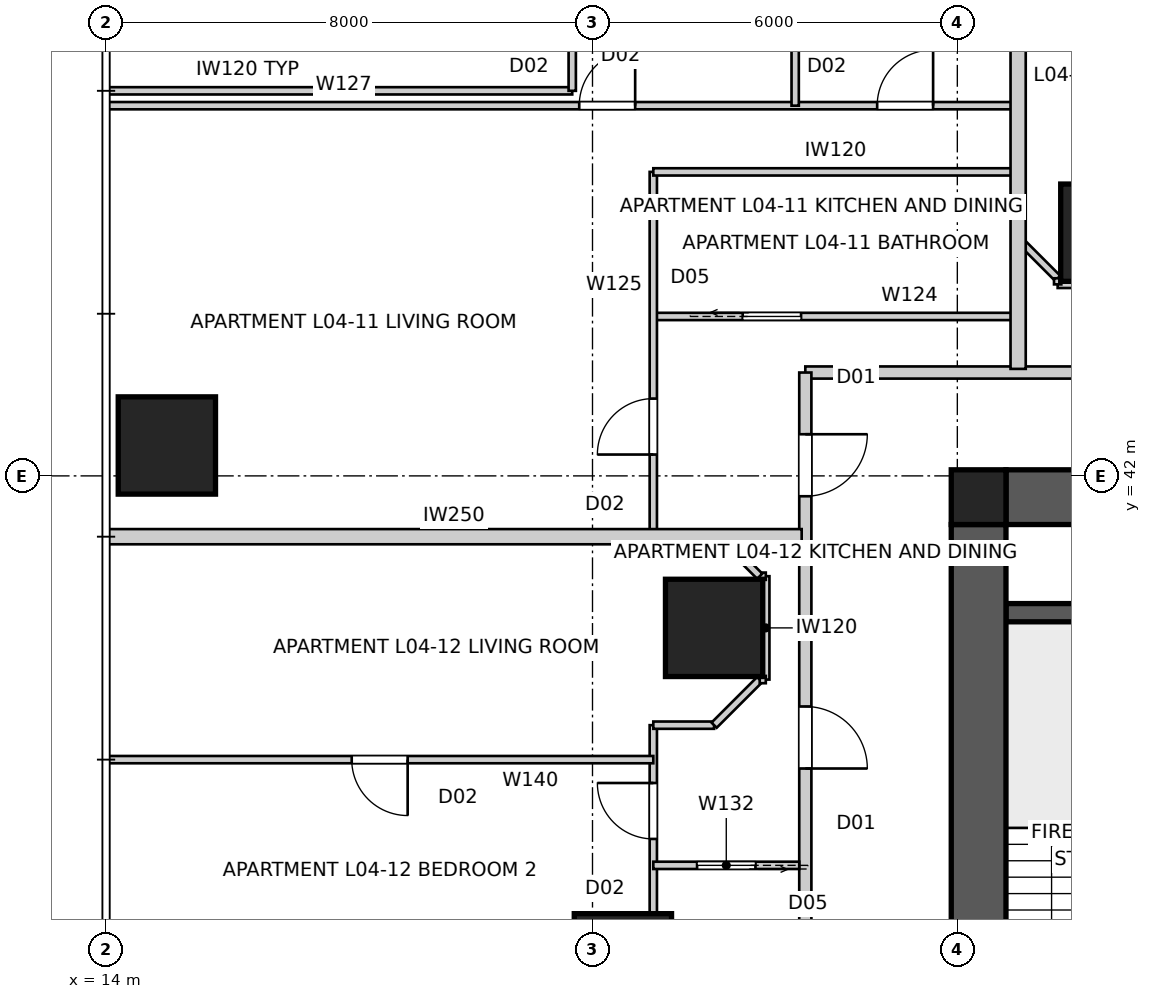
"""IFC4 building model, lengths in metres.
Left out: names, types, materials, properties, quantities, classifications, styles, units other than length and angle.
Written with IfcOpenShell. Run it as: python <this file> out.ifc"""

import sys

from ifc_helpers import new_model, si_unit, direction, frame, frame_2d, origin, origin_2d, place, context, subcontext, project, spatial, polyline, rectangle, outline, extrude, element, fill, save


model = new_model("IFC4")
c1 = context("Model", 3, precision=1e-05, world=origin(), true_north=direction((0.0, 1.0)))
c2 = subcontext(c1, "Body", "Model", "MODEL_VIEW")
j1 = project(units=[si_unit("LENGTHUNIT", "METRE"), si_unit("PLANEANGLEUNIT", "RADIAN")], contexts=[c1])
p1 = place(None, origin())
s1 = spatial("IfcSite", under=j1, at=p1, CompositionType="ELEMENT")
p2 = place(p1, origin())
s2 = spatial("IfcBuilding", under=s1, at=p2, CompositionType="ELEMENT")
p3 = place(p2, frame((0.0, 0.0, 18.4)))
s3 = spatial("IfcBuildingStorey", under=s2, at=p3, CompositionType="ELEMENT", Elevation=18.4)
p4 = place(p3, frame((28.8, 41.65, 0.0), z_axis=(0.0, 0.0, 1.0), x_axis=(1.0, 0.0, 0.0)))
e1 = element("IfcWall", 1, at=p4, inside=s3, PredefinedType="SHEAR", context=c2, shape_type="SweptSolid", body=[
    extrude(outline(polyline([(0.0, -0.45), (22.4, -0.45), (22.4, -0.025), (22.85, -0.025), (22.85, 0.025), (22.4, 0.025), (22.4, 0.45), (0.0, 0.45), (0.0, 0.025), (-0.45, 0.025), (-0.45, -0.025), (0.0, -0.025), (0.0, -0.45)])), origin(), (0.0, 0.0, 1.0), 3.4),
])
p5 = place(p3, frame((28.35, 41.2, 0.0), z_axis=(0.0, 0.0, 1.0), x_axis=(0.0, -1.0, 0.0)))
e2 = element("IfcWall", 2, at=p5, inside=s3, PredefinedType="SHEAR", context=c2, shape_type="SweptSolid", body=[
    extrude(outline(polyline([(0.0, -0.45), (22.4, -0.45), (22.4, -0.025), (22.85, -0.025), (22.85, 0.025), (22.4, 0.025), (22.4, 0.45), (0.0, 0.45), (0.0, 0.025), (-0.45, 0.025), (-0.45, -0.025), (0.0, -0.025), (0.0, -0.45)])), origin(), (0.0, 0.0, 1.0), 3.4),
])
p6 = place(p5, frame((11.14, 0.0, 0.0)))
e3 = element("IfcOpeningElement", 3, at=p6, cuts=e2, PredefinedType="OPENING", context=c2, shape_type="SweptSolid", body=[
    extrude(rectangle(XDim=1.02, YDim=2.4, at=frame_2d((0.51, 1.2))), frame((0.0, 0.46, 0.0), z_axis=(0.0, -1.0, 0.0), x_axis=(1.0, 0.0, 0.0)), (0.0, 0.0, 1.0), 0.92),
])
p7 = place(p3, frame((28.8, 39.75, 0.0), z_axis=(0.0, 0.0, 1.0), x_axis=(1.0, 0.0, 0.0)))
e4 = element("IfcWall", 4, at=p7, inside=s3, PredefinedType="SHEAR", context=c2, shape_type="SweptSolid", body=[
    extrude(rectangle(XDim=3.5, YDim=0.3, at=frame_2d((1.75, 0.0))), origin(), (0.0, 0.0, 1.0), 3.4),
])
p8 = place(p3, frame((28.35, 41.65, 0.0), z_axis=(0.0, 0.0, 1.0), x_axis=(1.0, 0.0, 0.0)))
e5 = element("IfcColumn", 5, at=p8, inside=s3, PredefinedType="COLUMN", context=c2, shape_type="SweptSolid", body=[
    extrude(rectangle(XDim=0.9, YDim=0.9, at=origin_2d()), origin(), (0.0, 0.0, 1.0), 3.4),
])
for number, where, z_axis, x_axis in (
    (6, (15.0, 42.5, 0.0), (0.0, 0.0, 1.0), (1.0, 0.0, 0.0)),
    (7, (30.5, 46.0, 0.0), (0.0, 0.0, 1.0), (1.0, 0.0, 0.0)),
    (8, (24.0, 39.5, 0.0), (0.0, 0.0, 1.0), (1.0, 0.0, 0.0)),
    (9, (22.5, 34.0, 0.0), (0.0, 0.0, 1.0), (1.0, 0.0, 0.0)),
):
    element("IfcColumn", number, at=place(p3, frame(where, z_axis=z_axis, x_axis=x_axis)), inside=s3, PredefinedType="COLUMN", context=c2, shape_type="SweptSolid", body=[
        extrude(rectangle(XDim=1.6, YDim=1.6, at=origin_2d()), origin(), (0.0, 0.0, 1.0), 3.4),
    ])
p9 = place(p3, frame((54.5, 43.7, 0.0), z_axis=(0.0, 0.0, 1.0), x_axis=(-1.0, 0.0, 0.0)))
e10 = element("IfcWall", 10, at=p9, inside=s3, PredefinedType="PARTITIONING", context=c2, shape_type="SweptSolid", body=[
    extrude(rectangle(XDim=29.0, YDim=0.2, at=frame_2d((14.5, 0.0))), origin(), (0.0, 0.0, 1.0), 3.25),
])
p10 = place(p9, frame((22.253, 0.0, 0.0)))
e11 = element("IfcOpeningElement", 11, at=p10, cuts=e10, PredefinedType="OPENING", context=c2, shape_type="SweptSolid", body=[
    extrude(rectangle(XDim=1.02, YDim=2.34, at=frame_2d((0.51, 1.17))), frame((0.0, 0.11, 0.0), z_axis=(0.0, -1.0, 0.0), x_axis=(1.0, 0.0, 0.0)), (0.0, 0.0, 1.0), 0.22),
])
p11 = place(p9, frame((5.393, 0.0, 0.0)))
e12 = element("IfcOpeningElement", 12, at=p11, cuts=e10, PredefinedType="OPENING", context=c2, shape_type="SweptSolid", body=[
    extrude(rectangle(XDim=1.02, YDim=2.34, at=frame_2d((0.51, 1.17))), frame((0.0, 0.11, 0.0), z_axis=(0.0, -1.0, 0.0), x_axis=(1.0, 0.0, 0.0)), (0.0, 0.0, 1.0), 0.22),
])
p12 = place(p9, frame((1.281, 0.0, 0.0)))
e13 = element("IfcOpeningElement", 13, at=p12, cuts=e10, PredefinedType="OPENING", context=c2, shape_type="SweptSolid", body=[
    extrude(rectangle(XDim=1.02, YDim=2.34, at=frame_2d((0.51, 1.17))), frame((0.0, 0.11, 0.0), z_axis=(0.0, -1.0, 0.0), x_axis=(1.0, 0.0, 0.0)), (0.0, 0.0, 1.0), 0.22),
])
p13 = place(p3, frame((25.5, 43.7, 0.0), z_axis=(0.0, 0.0, 1.0), x_axis=(0.0, -1.0, 0.0)))
e14 = element("IfcWall", 14, at=p13, inside=s3, PredefinedType="PARTITIONING", context=c2, shape_type="SweptSolid", body=[
    extrude(rectangle(XDim=27.4, YDim=0.2, at=frame_2d((13.7, 0.0))), origin(), (0.0, 0.0, 1.0), 3.25),
])
p14 = place(p13, frame((5.493, 0.0, 0.0)))
e15 = element("IfcOpeningElement", 15, at=p14, cuts=e14, PredefinedType="OPENING", context=c2, shape_type="SweptSolid", body=[
    extrude(rectangle(XDim=1.02, YDim=2.34, at=frame_2d((0.51, 1.17))), frame((0.0, 0.11, 0.0), z_axis=(0.0, -1.0, 0.0), x_axis=(1.0, 0.0, 0.0)), (0.0, 0.0, 1.0), 0.22),
])
p15 = place(p13, frame((15.16, 0.0, 0.0)))
e16 = element("IfcOpeningElement", 16, at=p15, cuts=e14, PredefinedType="OPENING", context=c2, shape_type="SweptSolid", body=[
    extrude(rectangle(XDim=1.02, YDim=2.34, at=frame_2d((0.51, 1.17))), frame((0.0, 0.11, 0.0), z_axis=(0.0, -1.0, 0.0), x_axis=(1.0, 0.0, 0.0)), (0.0, 0.0, 1.0), 0.22),
])
p16 = place(p13, frame((25.365, 0.0, 0.0)))
e17 = element("IfcOpeningElement", 17, at=p16, cuts=e14, PredefinedType="OPENING", context=c2, shape_type="SweptSolid", body=[
    extrude(rectangle(XDim=1.02, YDim=2.34, at=frame_2d((0.51, 1.17))), frame((0.0, 0.11, 0.0), z_axis=(0.0, -1.0, 0.0), x_axis=(1.0, 0.0, 0.0)), (0.0, 0.0, 1.0), 0.22),
])
p17 = place(p13, frame((1.015, 0.0, 0.0)))
e18 = element("IfcOpeningElement", 18, at=p17, cuts=e14, PredefinedType="OPENING", context=c2, shape_type="SweptSolid", body=[
    extrude(rectangle(XDim=1.02, YDim=2.34, at=frame_2d((0.51, 1.17))), frame((0.0, 0.11, 0.0), z_axis=(0.0, -1.0, 0.0), x_axis=(1.0, 0.0, 0.0)), (0.0, 0.0, 1.0), 0.22),
])
p18 = place(p3, frame((29.0, 56.0, 0.0), z_axis=(0.0, 0.0, 1.0), x_axis=(0.0, -1.0, 0.0)))
e19 = element("IfcWall", 19, at=p18, inside=s3, PredefinedType="PARTITIONING", context=c2, shape_type="SweptSolid", body=[
    extrude(rectangle(XDim=12.24, YDim=0.25, at=frame_2d((6.12, 0.0))), origin(), (0.0, 0.0, 1.0), 3.25),
])
p19 = place(p3, frame((14.0, 41.0, 0.0), z_axis=(0.0, 0.0, 1.0), x_axis=(1.0, 0.0, 0.0)))
e20 = element("IfcWall", 20, at=p19, inside=s3, PredefinedType="PARTITIONING", context=c2, shape_type="SweptSolid", body=[
    extrude(rectangle(XDim=11.44, YDim=0.25, at=frame_2d((5.72, 0.0))), origin(), (0.0, 0.0, 1.0), 3.25),
])
p20 = place(p3, frame((23.0, 22.667, 0.0), z_axis=(0.0, 0.0, 1.0), x_axis=(0.0, 1.0, 0.0)))
e21 = element("IfcWall", 21, at=p20, inside=s3, PredefinedType="PARTITIONING", context=c2, shape_type="SweptSolid", body=[
    extrude(rectangle(XDim=15.233, YDim=0.12, at=frame_2d((7.617, 0.0))), origin(), (0.0, 0.0, 1.0), 2.55),
])
p21 = place(p20, frame((13.362, 0.0, 0.0)))
e22 = element("IfcOpeningElement", 22, at=p21, cuts=e21, PredefinedType="OPENING", context=c2, shape_type="SweptSolid", body=[
    extrude(rectangle(XDim=0.92, YDim=2.34, at=frame_2d((0.46, 1.17))), frame((0.0, 0.07, 0.0), z_axis=(0.0, -1.0, 0.0), x_axis=(1.0, 0.0, 0.0)), (0.0, 0.0, 1.0), 0.14),
])
p22 = place(p20, frame((5.015, 0.0, 0.0)))
e23 = element("IfcOpeningElement", 23, at=p22, cuts=e21, PredefinedType="OPENING", context=c2, shape_type="SweptSolid", body=[
    extrude(rectangle(XDim=0.92, YDim=2.34, at=frame_2d((0.46, 1.17))), frame((0.0, 0.07, 0.0), z_axis=(0.0, -1.0, 0.0), x_axis=(1.0, 0.0, 0.0)), (0.0, 0.0, 1.0), 0.14),
])
p23 = place(p20, frame((8.362, 0.0, 0.0)))
e24 = element("IfcOpeningElement", 24, at=p23, cuts=e21, PredefinedType="OPENING", context=c2, shape_type="SweptSolid", body=[
    extrude(rectangle(XDim=0.96, YDim=2.1, at=frame_2d((0.48, 1.05))), frame((0.0, 0.07, 0.0), z_axis=(0.0, -1.0, 0.0), x_axis=(1.0, 0.0, 0.0)), (0.0, 0.0, 1.0), 0.14),
])
p24 = place(p3, frame((29.0, 45.9, 0.0), z_axis=(0.0, 0.0, 1.0), x_axis=(0.707106781187, -0.707106781187, 0.0)))
e25 = element("IfcWall", 25, at=p24, inside=s3, PredefinedType="PARTITIONING", context=c2, shape_type="SweptSolid", body=[
    extrude(rectangle(XDim=0.919, YDim=0.12, at=frame_2d((0.459, 0.0))), origin(), (0.0, 0.0, 1.0), 3.25),
])
p25 = place(p3, frame((29.65, 45.15, 0.0), z_axis=(0.0, 0.0, 1.0), x_axis=(1.0, 0.0, 0.0)))
e26 = element("IfcWall", 26, at=p25, inside=s3, PredefinedType="PARTITIONING", context=c2, shape_type="SweptSolid", body=[
    extrude(rectangle(XDim=1.7, YDim=0.12, at=frame_2d((0.85, 0.0))), origin(), (0.0, 0.0, 1.0), 3.25),
])
p26 = place(p3, frame((23.0, 44.622, 0.0), z_axis=(0.0, 0.0, 1.0), x_axis=(1.0, 0.0, 0.0)))
e27 = element("IfcWall", 27, at=p26, inside=s3, PredefinedType="PARTITIONING", context=c2, shape_type="SweptSolid", body=[
    extrude(rectangle(XDim=6.0, YDim=0.12, at=frame_2d((3.0, 0.0))), origin(), (0.0, 0.0, 1.0), 2.638),
])
p27 = place(p26, frame((1.47, 0.0, 0.0)))
e28 = element("IfcOpeningElement", 28, at=p27, cuts=e27, PredefinedType="OPENING", context=c2, shape_type="SweptSolid", body=[
    extrude(rectangle(XDim=0.96, YDim=2.1, at=frame_2d((0.48, 1.05))), frame((0.0, 0.07, 0.0), z_axis=(0.0, -1.0, 0.0), x_axis=(1.0, 0.0, 0.0)), (0.0, 0.0, 1.0), 0.14),
])
p28 = place(p3, frame((23.0, 41.0, 0.0), z_axis=(0.0, 0.0, 1.0), x_axis=(0.0, 1.0, 0.0)))
e29 = element("IfcWall", 29, at=p28, inside=s3, PredefinedType="PARTITIONING", context=c2, shape_type="SweptSolid", body=[
    extrude(rectangle(XDim=6.0, YDim=0.12, at=frame_2d((3.0, 0.0))), origin(), (0.0, 0.0, 1.0), 3.25),
])
p29 = place(p28, frame((1.351, 0.0, 0.0)))
e30 = element("IfcOpeningElement", 30, at=p29, cuts=e29, PredefinedType="OPENING", context=c2, shape_type="SweptSolid", body=[
    extrude(rectangle(XDim=0.92, YDim=2.34, at=frame_2d((0.46, 1.17))), frame((0.0, 0.07, 0.0), z_axis=(0.0, -1.0, 0.0), x_axis=(1.0, 0.0, 0.0)), (0.0, 0.0, 1.0), 0.14),
])
p30 = place(p3, frame((23.0, 47.0, 0.0), z_axis=(0.0, 0.0, 1.0), x_axis=(1.0, 0.0, 0.0)))
e31 = element("IfcWall", 31, at=p30, inside=s3, PredefinedType="PARTITIONING", context=c2, shape_type="SweptSolid", body=[
    extrude(rectangle(XDim=6.0, YDim=0.12, at=frame_2d((3.0, 0.0))), origin(), (0.0, 0.0, 1.0), 3.25),
])
p31 = place(p3, frame((14.04, 48.089, 0.0), z_axis=(0.0, 0.0, 1.0), x_axis=(1.0, 0.0, 0.0)))
e32 = element("IfcWall", 32, at=p31, inside=s3, PredefinedType="PARTITIONING", context=c2, shape_type="SweptSolid", body=[
    extrude(rectangle(XDim=14.96, YDim=0.12, at=frame_2d((7.48, 0.0))), origin(), (0.0, 0.0, 1.0), 3.25),
])
p32 = place(p31, frame((7.742, 0.0, 0.0)))
e33 = element("IfcOpeningElement", 33, at=p32, cuts=e32, PredefinedType="OPENING", context=c2, shape_type="SweptSolid", body=[
    extrude(rectangle(XDim=0.92, YDim=2.34, at=frame_2d((0.46, 1.17))), frame((0.0, 0.07, 0.0), z_axis=(0.0, -1.0, 0.0), x_axis=(1.0, 0.0, 0.0)), (0.0, 0.0, 1.0), 0.14),
])
p33 = place(p31, frame((12.642, 0.0, 0.0)))
e34 = element("IfcOpeningElement", 34, at=p33, cuts=e32, PredefinedType="OPENING", context=c2, shape_type="SweptSolid", body=[
    extrude(rectangle(XDim=0.92, YDim=2.34, at=frame_2d((0.46, 1.17))), frame((0.0, 0.07, 0.0), z_axis=(0.0, -1.0, 0.0), x_axis=(1.0, 0.0, 0.0)), (0.0, 0.0, 1.0), 0.14),
])
p34 = place(p3, frame((25.333, 55.96, 0.0), z_axis=(0.0, 0.0, 1.0), x_axis=(0.0, -1.0, 0.0)))
e35 = element("IfcWall", 35, at=p34, inside=s3, PredefinedType="PARTITIONING", context=c2, shape_type="SweptSolid", body=[
    extrude(rectangle(XDim=7.871, YDim=0.12, at=frame_2d((3.936, 0.0))), origin(), (0.0, 0.0, 1.0), 2.638),
])
p35 = place(p3, frame((14.04, 48.333, 0.0), z_axis=(0.0, 0.0, 1.0), x_axis=(1.0, 0.0, 0.0)))
e36 = element("IfcWall", 36, at=p35, inside=s3, PredefinedType="PARTITIONING", context=c2, shape_type="SweptSolid", body=[
    extrude(rectangle(XDim=7.627, YDim=0.12, at=frame_2d((3.813, 0.0))), origin(), (0.0, 0.0, 1.0), 3.25),
])
p36 = place(p3, frame((21.667, 48.333, 0.0), z_axis=(0.0, 0.0, 1.0), x_axis=(0.0, 1.0, 0.0)))
e37 = element("IfcWall", 37, at=p36, inside=s3, PredefinedType="PARTITIONING", context=c2, shape_type="SweptSolid", body=[
    extrude(rectangle(XDim=7.627, YDim=0.12, at=frame_2d((3.813, 0.0))), origin(), (0.0, 0.0, 1.0), 3.25),
])
p37 = place(p36, frame((5.182, 0.0, 0.0)))
e38 = element("IfcOpeningElement", 38, at=p37, cuts=e37, PredefinedType="OPENING", context=c2, shape_type="SweptSolid", body=[
    extrude(rectangle(XDim=0.92, YDim=2.34, at=frame_2d((0.46, 1.17))), frame((0.0, 0.07, 0.0), z_axis=(0.0, -1.0, 0.0), x_axis=(1.0, 0.0, 0.0)), (0.0, 0.0, 1.0), 0.14),
])
p38 = place(p36, frame((1.398, 0.0, 0.0)))
e39 = element("IfcOpeningElement", 39, at=p38, cuts=e37, PredefinedType="OPENING", context=c2, shape_type="SweptSolid", body=[
    extrude(rectangle(XDim=0.92, YDim=2.34, at=frame_2d((0.46, 1.17))), frame((0.0, 0.07, 0.0), z_axis=(0.0, -1.0, 0.0), x_axis=(1.0, 0.0, 0.0)), (0.0, 0.0, 1.0), 0.14),
])
p39 = place(p3, frame((25.4, 35.594, 0.0), z_axis=(0.0, 0.0, 1.0), x_axis=(-1.0, 0.0, 0.0)))
e40 = element("IfcWall", 40, at=p39, inside=s3, PredefinedType="PARTITIONING", context=c2, shape_type="SweptSolid", body=[
    extrude(rectangle(XDim=2.4, YDim=0.12, at=frame_2d((1.2, 0.0))), origin(), (0.0, 0.0, 1.0), 3.25),
])
p40 = place(p39, frame((0.72, 0.0, 0.0)))
e41 = element("IfcOpeningElement", 41, at=p40, cuts=e40, PredefinedType="OPENING", context=c2, shape_type="SweptSolid", body=[
    extrude(rectangle(XDim=0.96, YDim=2.1, at=frame_2d((0.48, 1.05))), frame((0.0, 0.07, 0.0), z_axis=(0.0, -1.0, 0.0), x_axis=(1.0, 0.0, 0.0)), (0.0, 0.0, 1.0), 0.14),
])
p41 = place(p3, frame((23.0, 37.9, 0.0), z_axis=(0.0, 0.0, 1.0), x_axis=(1.0, 0.0, 0.0)))
e42 = element("IfcWall", 42, at=p41, inside=s3, PredefinedType="PARTITIONING", context=c2, shape_type="SweptSolid", body=[
    extrude(rectangle(XDim=1.0, YDim=0.12, at=frame_2d((0.5, 0.0))), origin(), (0.0, 0.0, 1.0), 3.25),
])
p42 = place(p3, frame((24.0, 37.9, 0.0), z_axis=(0.0, 0.0, 1.0), x_axis=(0.707106781187, 0.707106781187, 0.0)))
e43 = element("IfcWall", 43, at=p42, inside=s3, PredefinedType="PARTITIONING", context=c2, shape_type="SweptSolid", body=[
    extrude(rectangle(XDim=1.061, YDim=0.12, at=frame_2d((0.53, 0.0))), origin(), (0.0, 0.0, 1.0), 3.25),
])
p43 = place(p3, frame((24.85, 38.65, 0.0), z_axis=(0.0, 0.0, 1.0), x_axis=(0.0, 1.0, 0.0)))
e44 = element("IfcWall", 44, at=p43, inside=s3, PredefinedType="PARTITIONING", context=c2, shape_type="SweptSolid", body=[
    extrude(rectangle(XDim=1.7, YDim=0.12, at=frame_2d((0.85, 0.0))), origin(), (0.0, 0.0, 1.0), 3.25),
])
p44 = place(p3, frame((24.75, 40.35, 0.0), z_axis=(0.0, 0.0, 1.0), x_axis=(-0.707106781187, 0.707106781187, 0.0)))
e45 = element("IfcWall", 45, at=p44, inside=s3, PredefinedType="PARTITIONING", context=c2, shape_type="SweptSolid", body=[
    extrude(rectangle(XDim=0.919, YDim=0.12, at=frame_2d((0.459, 0.0))), origin(), (0.0, 0.0, 1.0), 3.25),
])
p45 = place(p3, frame((23.0, 37.333, 0.0), z_axis=(0.0, 0.0, 1.0), x_axis=(-1.0, 0.0, 0.0)))
e46 = element("IfcWall", 46, at=p45, inside=s3, PredefinedType="PARTITIONING", context=c2, shape_type="SweptSolid", body=[
    extrude(rectangle(XDim=8.96, YDim=0.12, at=frame_2d((4.48, 0.0))), origin(), (0.0, 0.0, 1.0), 3.25),
])
p46 = place(p45, frame((4.04, 0.0, 0.0)))
e47 = element("IfcOpeningElement", 47, at=p46, cuts=e46, PredefinedType="OPENING", context=c2, shape_type="SweptSolid", body=[
    extrude(rectangle(XDim=0.92, YDim=2.34, at=frame_2d((0.46, 1.17))), frame((0.0, 0.07, 0.0), z_axis=(0.0, -1.0, 0.0), x_axis=(1.0, 0.0, 0.0)), (0.0, 0.0, 1.0), 0.14),
])
for number, where, z_axis, x_axis in (
    (48, (29.65, 45.15, 0.0), (0.0, 0.0, 1.0), (0.0, 1.0, 0.0)),
    (49, (24.85, 38.65, 0.0), (0.0, 0.0, 1.0), (-1.0, 0.0, 0.0)),
    (50, (24.85, 40.35, 0.0), (0.0, 0.0, 1.0), (-1.0, 0.0, 0.0)),
):
    element("IfcWall", number, at=place(p3, frame(where, z_axis=z_axis, x_axis=x_axis)), inside=s3, PredefinedType="PARTITIONING", context=c2, shape_type="SweptSolid", body=[
        extrude(rectangle(XDim=0.1, YDim=0.12, at=frame_2d((0.05, 0.0))), origin(), (0.0, 0.0, 1.0), 3.25),
    ])
p47 = place(p14, origin())
e51 = element("IfcDoor", 51, at=p47, inside=s3, OperationType="SINGLE_SWING_RIGHT", PredefinedType="DOOR", context=c2, shape_type="SweptSolid", body=[
    extrude(rectangle(XDim=1.02, YDim=2.34, at=frame_2d((0.51, 1.17))), frame((0.0, 0.025, 0.0), z_axis=(0.0, -1.0, 0.0), x_axis=(1.0, 0.0, 0.0)), (0.0, 0.0, 1.0), 0.05),
])
fill(e15, e51)
p48 = place(p17, origin())
e52 = element("IfcDoor", 52, at=p48, inside=s3, OperationType="SINGLE_SWING_LEFT", PredefinedType="DOOR", context=c2, shape_type="SweptSolid", body=[
    extrude(rectangle(XDim=1.02, YDim=2.34, at=frame_2d((0.51, 1.17))), frame((0.0, 0.025, 0.0), z_axis=(0.0, -1.0, 0.0), x_axis=(1.0, 0.0, 0.0)), (0.0, 0.0, 1.0), 0.05),
])
fill(e18, e52)
p49 = place(p40, origin())
e53 = element("IfcDoor", 53, at=p49, inside=s3, OperationType="SLIDING_TO_LEFT", PredefinedType="DOOR", context=c2, shape_type="SweptSolid", body=[
    extrude(rectangle(XDim=0.96, YDim=2.1, at=frame_2d((0.48, 1.05))), frame((0.0, 0.025, 0.0), z_axis=(0.0, -1.0, 0.0), x_axis=(1.0, 0.0, 0.0)), (0.0, 0.0, 1.0), 0.05),
])
fill(e41, e53)
p50 = place(p21, origin())
e54 = element("IfcDoor", 54, at=p50, inside=s3, OperationType="SINGLE_SWING_RIGHT", PredefinedType="DOOR", context=c2, shape_type="SweptSolid", body=[
    extrude(rectangle(XDim=0.92, YDim=2.34, at=frame_2d((0.46, 1.17))), frame((0.0, 0.025, 0.0), z_axis=(0.0, -1.0, 0.0), x_axis=(1.0, 0.0, 0.0)), (0.0, 0.0, 1.0), 0.05),
])
fill(e22, e54)
p51 = place(p27, origin())
e55 = element("IfcDoor", 55, at=p51, inside=s3, OperationType="SLIDING_TO_LEFT", PredefinedType="DOOR", context=c2, shape_type="SweptSolid", body=[
    extrude(rectangle(XDim=0.96, YDim=2.1, at=frame_2d((0.48, 1.05))), frame((0.0, 0.025, 0.0), z_axis=(0.0, -1.0, 0.0), x_axis=(1.0, 0.0, 0.0)), (0.0, 0.0, 1.0), 0.05),
])
fill(e28, e55)
p52 = place(p29, origin())
e56 = element("IfcDoor", 56, at=p52, inside=s3, OperationType="SINGLE_SWING_LEFT", PredefinedType="DOOR", context=c2, shape_type="SweptSolid", body=[
    extrude(rectangle(XDim=0.92, YDim=2.34, at=frame_2d((0.46, 1.17))), frame((0.0, 0.025, 0.0), z_axis=(0.0, -1.0, 0.0), x_axis=(1.0, 0.0, 0.0)), (0.0, 0.0, 1.0), 0.05),
])
fill(e30, e56)
p53 = place(p32, origin())
e57 = element("IfcDoor", 57, at=p53, inside=s3, OperationType="SINGLE_SWING_RIGHT", PredefinedType="DOOR", context=c2, shape_type="SweptSolid", body=[
    extrude(rectangle(XDim=0.92, YDim=2.34, at=frame_2d((0.46, 1.17))), frame((0.0, 0.025, 0.0), z_axis=(0.0, -1.0, 0.0), x_axis=(1.0, 0.0, 0.0)), (0.0, 0.0, 1.0), 0.05),
])
fill(e33, e57)
p54 = place(p33, origin())
e58 = element("IfcDoor", 58, at=p54, inside=s3, OperationType="SINGLE_SWING_RIGHT", PredefinedType="DOOR", context=c2, shape_type="SweptSolid", body=[
    extrude(rectangle(XDim=0.92, YDim=2.34, at=frame_2d((0.46, 1.17))), frame((0.0, 0.025, 0.0), z_axis=(0.0, -1.0, 0.0), x_axis=(1.0, 0.0, 0.0)), (0.0, 0.0, 1.0), 0.05),
])
fill(e34, e58)
p55 = place(p46, origin())
e59 = element("IfcDoor", 59, at=p55, inside=s3, OperationType="SINGLE_SWING_LEFT", PredefinedType="DOOR", context=c2, shape_type="SweptSolid", body=[
    extrude(rectangle(XDim=0.92, YDim=2.34, at=frame_2d((0.46, 1.17))), frame((0.0, 0.025, 0.0), z_axis=(0.0, -1.0, 0.0), x_axis=(1.0, 0.0, 0.0)), (0.0, 0.0, 1.0), 0.05),
])
fill(e47, e59)
save(model, sys.argv[1])
